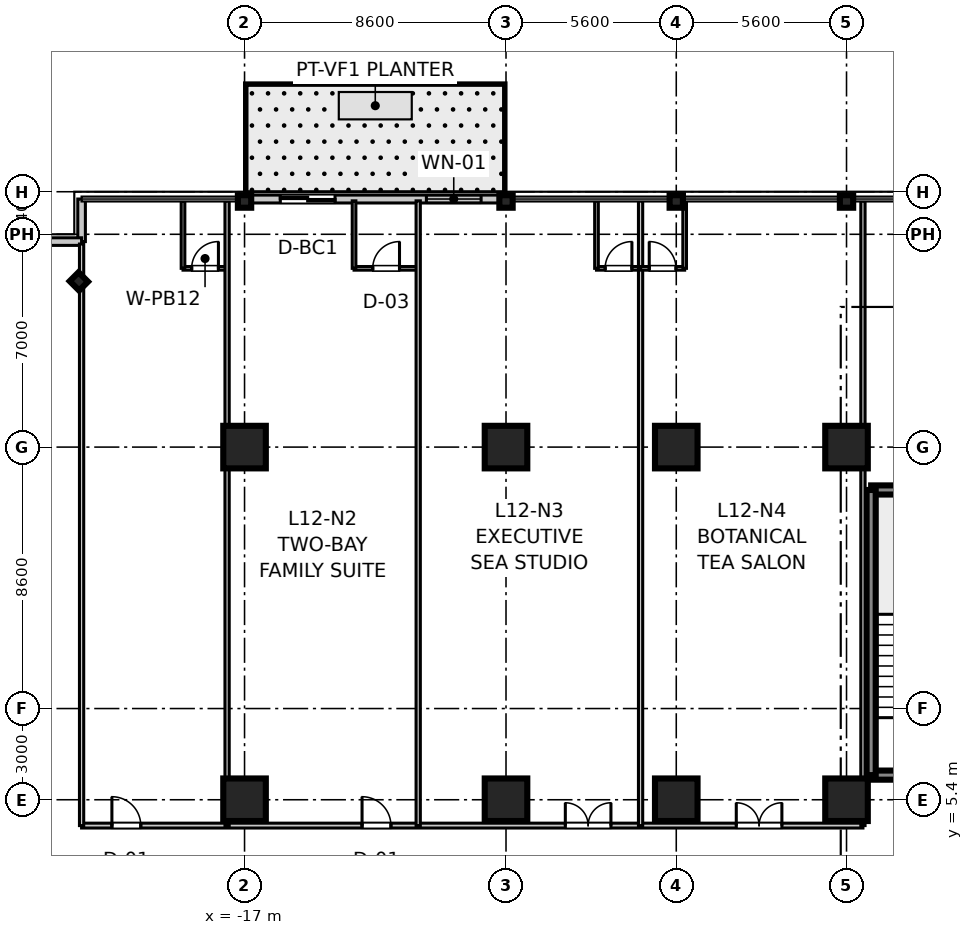
"""IFC4 building model, lengths in metres.
Left out: names, types, materials, properties, quantities, classifications, styles, units other than length and angle.
Written with IfcOpenShell. Run it as: python <this file> out.ifc"""

import sys

from ifc_helpers import new_model, si_unit, direction, frame, frame_2d, origin, origin_2d, place, context, subcontext, project, spatial, rectangle, i_section, extrude, source, transform, mapped, element, fill, save


model = new_model("IFC4")
c1 = context("Model", 3, precision=1e-05, world=origin(), true_north=direction((0.0, 1.0)))
c2 = subcontext(c1, "Body", "Model", "MODEL_VIEW")
j1 = project(units=[si_unit("LENGTHUNIT", "METRE"), si_unit("PLANEANGLEUNIT", "RADIAN")], contexts=[c1])
p1 = place(None, origin())
s1 = spatial("IfcSite", under=j1, at=p1, CompositionType="ELEMENT")
p2 = place(p1, origin())
s2 = spatial("IfcBuilding", under=s1, at=p2, CompositionType="ELEMENT")
p3 = place(p2, frame((0.0, 0.0, 54.3)))
s3 = spatial("IfcBuildingStorey", under=s2, at=p3, CompositionType="ELEMENT", Elevation=54.3)
m1 = source(origin(), c2, "Body", "SweptSolid", [
    extrude(rectangle(XDim=1.4, YDim=1.4, at=origin_2d()), origin(), (0.0, 0.0, 1.0), 3.605),
])
for number, where, z_axis, x_axis in (
    (1, (-17.0, 5.4, 0.0), (0.0, 0.0, 1.0), (1.0, 0.0, 0.0)),
    (2, (-17.0, 17.0, 0.0), (0.0, 0.0, 1.0), (1.0, 0.0, 0.0)),
    (3, (-8.4, 5.4, 0.0), (0.0, 0.0, 1.0), (1.0, 0.0, 0.0)),
    (4, (-8.4, 17.0, 0.0), (0.0, 0.0, 1.0), (1.0, 0.0, 0.0)),
    (5, (-2.8, 5.4, 0.0), (0.0, 0.0, 1.0), (1.0, 0.0, 0.0)),
    (6, (-2.8, 17.0, 0.0), (0.0, 0.0, 1.0), (1.0, 0.0, 0.0)),
    (7, (2.8, 5.4, 0.0), (0.0, 0.0, 1.0), (1.0, 0.0, 0.0)),
    (8, (2.8, 17.0, 0.0), (0.0, 0.0, 1.0), (1.0, 0.0, 0.0)),
):
    element("IfcColumn", number, at=place(p3, frame(where, z_axis=z_axis, x_axis=x_axis)), inside=s3, PredefinedType="COLUMN", context=c2, shape_type="MappedRepresentation", body=[
        mapped(m1, transform((0.0, 0.0, 0.0), scale=1.0)),
    ])
m2 = source(origin(), c2, "Body", "SweptSolid", [
    extrude(i_section(OverallWidth=0.412, OverallDepth=0.438, WebThickness=0.023, FlangeThickness=0.036, at=origin_2d()), origin(), (0.0, 0.0, 1.0), 3.605),
])
for number, where, z_axis, x_axis in (
    (9, (-17.0, 25.08, 0.0), (0.0, 0.0, 1.0), (0.0, 1.0, 0.0)),
    (10, (-8.4, 25.08, 0.0), (0.0, 0.0, 1.0), (0.0, 1.0, 0.0)),
    (11, (-2.8, 25.08, 0.0), (0.0, 0.0, 1.0), (0.0, 1.0, 0.0)),
    (12, (2.8, 25.08, 0.0), (0.0, 0.0, 1.0), (0.0, 1.0, 0.0)),
    (13, (-22.45, 22.45, 0.0), (0.0, 0.0, 1.0), (0.707, 0.707, 0.0)),
):
    element("IfcColumn", number, at=place(p3, frame(where, z_axis=z_axis, x_axis=x_axis)), inside=s3, PredefinedType="COLUMN", context=c2, shape_type="MappedRepresentation", body=[
        mapped(m2, transform((0.0, 0.0, 0.0), scale=1.0)),
    ])
m3 = source(origin(), c2, "Body", "SweptSolid", [
    extrude(rectangle(XDim=3.98, YDim=0.3, at=frame_2d((1.99, 0.0))), origin(), (0.0, 0.0, 1.0), 3.37),
])
for number, where, z_axis, x_axis in (
    (14, (3.61, 6.21, 0.0), (0.0, 0.0, 1.0), (1.0, 0.0, 0.0)),
    (15, (3.61, 15.59, 0.0), (0.0, 0.0, 1.0), (1.0, 0.0, 0.0)),
):
    element("IfcWall", number, at=place(p3, frame(where, z_axis=z_axis, x_axis=x_axis)), inside=s3, PredefinedType="SHEAR", context=c2, shape_type="MappedRepresentation", body=[
        mapped(m3, transform((0.0, 0.0, 0.0), scale=1.0)),
    ])
m4 = source(origin(), c2, "Body", "SweptSolid", [
    extrude(rectangle(XDim=9.38, YDim=0.3, at=frame_2d((4.69, 0.0))), origin(), (0.0, 0.0, 1.0), 3.37),
])
p4 = place(p3, frame((3.61, 6.21, 0.0), z_axis=(0.0, 0.0, 1.0), x_axis=(0.0, 1.0, 0.0)))
e16 = element("IfcWall", 16, at=p4, inside=s3, PredefinedType="SHEAR", context=c2, shape_type="MappedRepresentation", body=[
    mapped(m4, transform((0.0, 0.0, 0.0), scale=1.0)),
])
m5 = source(origin(), c2, "Body", "SweptSolid", [
    extrude(rectangle(XDim=1.4, YDim=0.25, at=frame_2d((0.7, 0.0))), origin(), (0.0, 0.0, 1.0), 3.37),
])
for number, where, z_axis, x_axis in (
    (17, (-22.36, 23.76, 0.0), (0.0, 0.0, 1.0), (0.0, 1.0, 0.0)),
    (18, (-23.76, 23.76, 0.0), (0.0, 0.0, 1.0), (1.0, 0.0, 0.0)),
):
    element("IfcWall", number, at=place(p3, frame(where, z_axis=z_axis, x_axis=x_axis)), inside=s3, PredefinedType="STANDARD", context=c2, shape_type="MappedRepresentation", body=[
        mapped(m5, transform((0.0, 0.0, 0.0), scale=1.0)),
    ])
m6 = source(origin(), c2, "Body", "SweptSolid", [
    extrude(rectangle(XDim=8.6, YDim=0.26, at=frame_2d((4.3, 0.0))), origin(), (0.0, 0.0, 1.0), 2.85),
])
p5 = place(p3, frame((-17.0, 25.16, 0.0), z_axis=(0.0, 0.0, 1.0), x_axis=(1.0, 0.0, 0.0)))
e19 = element("IfcWall", 19, at=p5, inside=s3, PredefinedType="STANDARD", context=c2, shape_type="MappedRepresentation", body=[
    mapped(m6, transform((0.0, 0.0, 0.0), scale=1.0)),
])
p6 = place(p5, frame((1.176, 0.0, 0.0)))
e20 = element("IfcOpeningElement", 20, at=p6, cuts=e19, PredefinedType="OPENING", context=c2, shape_type="SweptSolid", body=[
    extrude(rectangle(XDim=1.8, YDim=2.25, at=frame_2d((0.9, 1.125))), frame((0.0, 0.14, 0.0), z_axis=(0.0, -1.0, 0.0), x_axis=(1.0, 0.0, 0.0)), (0.0, 0.0, 1.0), 0.28),
])
p7 = place(p5, frame((5.981, 0.0, 0.85)))
e21 = element("IfcOpeningElement", 21, at=p7, cuts=e19, PredefinedType="OPENING", context=c2, shape_type="SweptSolid", body=[
    extrude(rectangle(XDim=1.8, YDim=1.5, at=frame_2d((0.9, 0.75))), frame((0.0, 0.14, 0.0), z_axis=(0.0, -1.0, 0.0), x_axis=(1.0, 0.0, 0.0)), (0.0, 0.0, 1.0), 0.28),
])
m7 = source(origin(), c2, "Body", "SweptSolid", [
    extrude(rectangle(XDim=25.7, YDim=0.16, at=frame_2d((12.85, 0.0))), origin(), (0.0, 0.0, 1.0), 2.71),
])
p8 = place(p3, frame((-22.36, 4.55, 0.0), z_axis=(0.0, 0.0, 1.0), x_axis=(1.0, 0.0, 0.0)))
e22 = element("IfcWall", 22, at=p8, inside=s3, PredefinedType="PARTITIONING", context=c2, shape_type="MappedRepresentation", body=[
    mapped(m7, transform((0.0, 0.0, 0.0), scale=1.0)),
])
p9 = place(p8, frame((0.997, 0.0, 0.0)))
e23 = element("IfcOpeningElement", 23, at=p9, cuts=e22, PredefinedType="OPENING", context=c2, shape_type="SweptSolid", body=[
    extrude(rectangle(XDim=0.95, YDim=2.1, at=frame_2d((0.475, 1.05))), frame((0.0, 0.09, 0.0), z_axis=(0.0, -1.0, 0.0), x_axis=(1.0, 0.0, 0.0)), (0.0, 0.0, 1.0), 0.18),
])
p10 = place(p8, frame((9.225, 0.0, 0.0)))
e24 = element("IfcOpeningElement", 24, at=p10, cuts=e22, PredefinedType="OPENING", context=c2, shape_type="SweptSolid", body=[
    extrude(rectangle(XDim=0.95, YDim=2.1, at=frame_2d((0.475, 1.05))), frame((0.0, 0.09, 0.0), z_axis=(0.0, -1.0, 0.0), x_axis=(1.0, 0.0, 0.0)), (0.0, 0.0, 1.0), 0.18),
])
p11 = place(p8, frame((15.911, 0.0, 0.0)))
e25 = element("IfcOpeningElement", 25, at=p11, cuts=e22, PredefinedType="OPENING", context=c2, shape_type="SweptSolid", body=[
    extrude(rectangle(XDim=1.5, YDim=2.15, at=frame_2d((0.75, 1.075))), frame((0.0, 0.09, 0.0), z_axis=(0.0, -1.0, 0.0), x_axis=(1.0, 0.0, 0.0)), (0.0, 0.0, 1.0), 0.18),
])
p12 = place(p8, frame((21.534, 0.0, 0.0)))
e26 = element("IfcOpeningElement", 26, at=p12, cuts=e22, PredefinedType="OPENING", context=c2, shape_type="SweptSolid", body=[
    extrude(rectangle(XDim=1.5, YDim=2.15, at=frame_2d((0.75, 1.075))), frame((0.0, 0.09, 0.0), z_axis=(0.0, -1.0, 0.0), x_axis=(1.0, 0.0, 0.0)), (0.0, 0.0, 1.0), 0.18),
])
m8 = source(origin(), c2, "Body", "SweptSolid", [
    extrude(rectangle(XDim=19.13, YDim=0.14, at=frame_2d((9.565, 0.0))), origin(), (0.0, 0.0, 1.0), 2.71),
])
p13 = place(p3, frame((-22.36, 4.55, 0.0), z_axis=(0.0, 0.0, 1.0), x_axis=(0.0, 1.0, 0.0)))
e27 = element("IfcWall", 27, at=p13, inside=s3, PredefinedType="PARTITIONING", context=c2, shape_type="MappedRepresentation", body=[
    mapped(m8, transform((0.0, 0.0, 0.0), scale=1.0)),
])
m9 = source(origin(), c2, "Body", "SweptSolid", [
    extrude(rectangle(XDim=20.55, YDim=0.14, at=frame_2d((10.275, 0.0))), origin(), (0.0, 0.0, 1.0), 2.71),
])
p14 = place(p3, frame((3.34, 4.55, 0.0), z_axis=(0.0, 0.0, 1.0), x_axis=(0.0, 1.0, 0.0)))
e28 = element("IfcWall", 28, at=p14, inside=s3, PredefinedType="PARTITIONING", context=c2, shape_type="MappedRepresentation", body=[
    mapped(m9, transform((0.0, 0.0, 0.0), scale=1.0)),
])
m10 = source(origin(), c2, "Body", "SweptSolid", [
    extrude(rectangle(XDim=1.45, YDim=0.12, at=frame_2d((0.725, 0.0))), origin(), (0.0, 0.0, 1.0), 2.71),
])
p15 = place(p3, frame((-19.024, 22.88, 0.0), z_axis=(0.0, 0.0, 1.0), x_axis=(1.0, 0.0, 0.0)))
e29 = element("IfcWall", 29, at=p15, inside=s3, PredefinedType="PARTITIONING", context=c2, shape_type="MappedRepresentation", body=[
    mapped(m10, transform((0.0, 0.0, 0.0), scale=1.0)),
])
p16 = place(p15, frame((0.285, 0.0, 0.0)))
e30 = element("IfcOpeningElement", 30, at=p16, cuts=e29, PredefinedType="OPENING", context=c2, shape_type="SweptSolid", body=[
    extrude(rectangle(XDim=0.88, YDim=2.1, at=frame_2d((0.44, 1.05))), frame((0.0, 0.07, 0.0), z_axis=(0.0, -1.0, 0.0), x_axis=(1.0, 0.0, 0.0)), (0.0, 0.0, 1.0), 0.14),
])
m11 = source(origin(), c2, "Body", "SweptSolid", [
    extrude(rectangle(XDim=2.22, YDim=0.12, at=frame_2d((1.11, 0.0))), origin(), (0.0, 0.0, 1.0), 2.71),
])
p17 = place(p3, frame((-19.024, 22.88, 0.0), z_axis=(0.0, 0.0, 1.0), x_axis=(0.0, 1.0, 0.0)))
e31 = element("IfcWall", 31, at=p17, inside=s3, PredefinedType="PARTITIONING", context=c2, shape_type="MappedRepresentation", body=[
    mapped(m11, transform((0.0, 0.0, 0.0), scale=1.0)),
])
p18 = place(p3, frame((-17.574, 4.55, 0.0), z_axis=(0.0, 0.0, 1.0), x_axis=(0.0, 1.0, 0.0)))
e32 = element("IfcWall", 32, at=p18, inside=s3, PredefinedType="PARTITIONING", context=c2, shape_type="MappedRepresentation", body=[
    mapped(m9, transform((0.0, 0.0, 0.0), scale=1.0)),
])
m12 = source(origin(), c2, "Body", "SweptSolid", [
    extrude(rectangle(XDim=2.11, YDim=0.12, at=frame_2d((1.055, 0.0))), origin(), (0.0, 0.0, 1.0), 2.71),
])
p19 = place(p3, frame((-13.398, 22.88, 0.0), z_axis=(0.0, 0.0, 1.0), x_axis=(1.0, 0.0, 0.0)))
e33 = element("IfcWall", 33, at=p19, inside=s3, PredefinedType="PARTITIONING", context=c2, shape_type="MappedRepresentation", body=[
    mapped(m12, transform((0.0, 0.0, 0.0), scale=1.0)),
])
p20 = place(p19, frame((0.615, 0.0, 0.0)))
e34 = element("IfcOpeningElement", 34, at=p20, cuts=e33, PredefinedType="OPENING", context=c2, shape_type="SweptSolid", body=[
    extrude(rectangle(XDim=0.88, YDim=2.1, at=frame_2d((0.44, 1.05))), frame((0.0, 0.07, 0.0), z_axis=(0.0, -1.0, 0.0), x_axis=(1.0, 0.0, 0.0)), (0.0, 0.0, 1.0), 0.14),
])
p21 = place(p3, frame((-13.398, 22.88, 0.0), z_axis=(0.0, 0.0, 1.0), x_axis=(0.0, 1.0, 0.0)))
e35 = element("IfcWall", 35, at=p21, inside=s3, PredefinedType="PARTITIONING", context=c2, shape_type="MappedRepresentation", body=[
    mapped(m11, transform((0.0, 0.0, 0.0), scale=1.0)),
])
p22 = place(p3, frame((-11.288, 4.55, 0.0), z_axis=(0.0, 0.0, 1.0), x_axis=(0.0, 1.0, 0.0)))
e36 = element("IfcWall", 36, at=p22, inside=s3, PredefinedType="PARTITIONING", context=c2, shape_type="MappedRepresentation", body=[
    mapped(m9, transform((0.0, 0.0, 0.0), scale=1.0)),
])
p23 = place(p3, frame((-5.424, 22.88, 0.0), z_axis=(0.0, 0.0, 1.0), x_axis=(1.0, 0.0, 0.0)))
e37 = element("IfcWall", 37, at=p23, inside=s3, PredefinedType="PARTITIONING", context=c2, shape_type="MappedRepresentation", body=[
    mapped(m10, transform((0.0, 0.0, 0.0), scale=1.0)),
])
p24 = place(p23, frame((0.285, 0.0, 0.0)))
e38 = element("IfcOpeningElement", 38, at=p24, cuts=e37, PredefinedType="OPENING", context=c2, shape_type="SweptSolid", body=[
    extrude(rectangle(XDim=0.88, YDim=2.1, at=frame_2d((0.44, 1.05))), frame((0.0, 0.07, 0.0), z_axis=(0.0, -1.0, 0.0), x_axis=(1.0, 0.0, 0.0)), (0.0, 0.0, 1.0), 0.14),
])
p25 = place(p3, frame((-5.424, 22.88, 0.0), z_axis=(0.0, 0.0, 1.0), x_axis=(0.0, 1.0, 0.0)))
e39 = element("IfcWall", 39, at=p25, inside=s3, PredefinedType="PARTITIONING", context=c2, shape_type="MappedRepresentation", body=[
    mapped(m11, transform((0.0, 0.0, 0.0), scale=1.0)),
])
p26 = place(p3, frame((-3.974, 4.55, 0.0), z_axis=(0.0, 0.0, 1.0), x_axis=(0.0, 1.0, 0.0)))
e40 = element("IfcWall", 40, at=p26, inside=s3, PredefinedType="PARTITIONING", context=c2, shape_type="MappedRepresentation", body=[
    mapped(m9, transform((0.0, 0.0, 0.0), scale=1.0)),
])
m13 = source(origin(), c2, "Body", "SweptSolid", [
    extrude(rectangle(XDim=1.45, YDim=0.12, at=frame_2d((0.725, 0.0))), origin(), (0.0, 0.0, 1.0), 2.71),
])
p27 = place(p3, frame((-3.974, 22.88, 0.0), z_axis=(0.0, 0.0, 1.0), x_axis=(1.0, 0.0, 0.0)))
e41 = element("IfcWall", 41, at=p27, inside=s3, PredefinedType="PARTITIONING", context=c2, shape_type="MappedRepresentation", body=[
    mapped(m13, transform((0.0, 0.0, 0.0), scale=1.0)),
])
p28 = place(p27, frame((0.285, 0.0, 0.0)))
e42 = element("IfcOpeningElement", 42, at=p28, cuts=e41, PredefinedType="OPENING", context=c2, shape_type="SweptSolid", body=[
    extrude(rectangle(XDim=0.88, YDim=2.1, at=frame_2d((0.44, 1.05))), frame((0.0, 0.07, 0.0), z_axis=(0.0, -1.0, 0.0), x_axis=(1.0, 0.0, 0.0)), (0.0, 0.0, 1.0), 0.14),
])
p29 = place(p3, frame((-2.524, 22.88, 0.0), z_axis=(0.0, 0.0, 1.0), x_axis=(0.0, 1.0, 0.0)))
e43 = element("IfcWall", 43, at=p29, inside=s3, PredefinedType="PARTITIONING", context=c2, shape_type="MappedRepresentation", body=[
    mapped(m11, transform((0.0, 0.0, 0.0), scale=1.0)),
])
m14 = source(origin(), c2, "Body", "SweptSolid", [
    extrude(rectangle(XDim=0.88, YDim=2.1, at=frame_2d((0.44, 1.05))), frame((0.0, 0.025, 0.0), z_axis=(0.0, -1.0, 0.0), x_axis=(1.0, 0.0, 0.0)), (0.0, 0.0, 1.0), 0.05),
])
p30 = place(p16, origin())
e44 = element("IfcDoor", 44, at=p30, inside=s3, OperationType="SINGLE_SWING_RIGHT", PredefinedType="DOOR", context=c2, shape_type="MappedRepresentation", body=[
    mapped(m14, transform((0.0, 0.0, 0.0), scale=1.0)),
])
fill(e30, e44)
m15 = source(origin(), c2, "Body", "SweptSolid", [
    extrude(rectangle(XDim=0.95, YDim=2.1, at=frame_2d((0.475, 1.05))), frame((0.0, 0.025, 0.0), z_axis=(0.0, -1.0, 0.0), x_axis=(1.0, 0.0, 0.0)), (0.0, 0.0, 1.0), 0.05),
])
p31 = place(p9, origin())
e45 = element("IfcDoor", 45, at=p31, inside=s3, OperationType="SINGLE_SWING_LEFT", PredefinedType="DOOR", context=c2, shape_type="MappedRepresentation", body=[
    mapped(m15, transform((0.0, 0.0, 0.0), scale=1.0)),
])
fill(e23, e45)
p32 = place(p20, origin())
e46 = element("IfcDoor", 46, at=p32, inside=s3, OperationType="SINGLE_SWING_RIGHT", PredefinedType="DOOR", context=c2, shape_type="MappedRepresentation", body=[
    mapped(m14, transform((0.0, 0.0, 0.0), scale=1.0)),
])
fill(e34, e46)
p33 = place(p10, origin())
e47 = element("IfcDoor", 47, at=p33, inside=s3, OperationType="SINGLE_SWING_LEFT", PredefinedType="DOOR", context=c2, shape_type="MappedRepresentation", body=[
    mapped(m15, transform((0.0, 0.0, 0.0), scale=1.0)),
])
fill(e24, e47)
p34 = place(p24, origin())
e48 = element("IfcDoor", 48, at=p34, inside=s3, OperationType="SINGLE_SWING_RIGHT", PredefinedType="DOOR", context=c2, shape_type="MappedRepresentation", body=[
    mapped(m14, transform((0.0, 0.0, 0.0), scale=1.0)),
])
fill(e38, e48)
m16 = source(origin(), c2, "Body", "SweptSolid", [
    extrude(rectangle(XDim=1.5, YDim=2.15, at=frame_2d((0.75, 1.075))), frame((0.0, 0.025, 0.0), z_axis=(0.0, -1.0, 0.0), x_axis=(1.0, 0.0, 0.0)), (0.0, 0.0, 1.0), 0.05),
])
p35 = place(p11, origin())
e49 = element("IfcDoor", 49, at=p35, inside=s3, OperationType="DOUBLE_DOOR_SINGLE_SWING", PredefinedType="DOOR", context=c2, shape_type="MappedRepresentation", body=[
    mapped(m16, transform((0.0, 0.0, 0.0), scale=1.0)),
])
fill(e25, e49)
p36 = place(p28, origin())
e50 = element("IfcDoor", 50, at=p36, inside=s3, OperationType="SINGLE_SWING_LEFT", PredefinedType="DOOR", context=c2, shape_type="MappedRepresentation", body=[
    mapped(m14, transform((0.0, 0.0, 0.0), scale=1.0)),
])
fill(e42, e50)
p37 = place(p12, origin())
e51 = element("IfcDoor", 51, at=p37, inside=s3, OperationType="DOUBLE_DOOR_SINGLE_SWING", PredefinedType="DOOR", context=c2, shape_type="MappedRepresentation", body=[
    mapped(m16, transform((0.0, 0.0, 0.0), scale=1.0)),
])
fill(e26, e51)
m17 = source(origin(), c2, "Body", "SweptSolid", [
    extrude(rectangle(XDim=1.8, YDim=2.25, at=frame_2d((0.9, 1.125))), frame((0.0, 0.025, 0.0), z_axis=(0.0, -1.0, 0.0), x_axis=(1.0, 0.0, 0.0)), (0.0, 0.0, 1.0), 0.05),
])
p38 = place(p6, origin())
e52 = element("IfcDoor", 52, at=p38, inside=s3, OperationType="DOUBLE_DOOR_SLIDING", PredefinedType="DOOR", context=c2, shape_type="MappedRepresentation", body=[
    mapped(m17, transform((0.0, 0.0, 0.0), scale=1.0)),
])
fill(e20, e52)
m18 = source(origin(), c2, "Body", "SweptSolid", [
    extrude(rectangle(XDim=1.8, YDim=1.5, at=frame_2d((0.9, 0.75))), frame((0.0, 0.03, 0.0), z_axis=(0.0, -1.0, 0.0), x_axis=(1.0, 0.0, 0.0)), (0.0, 0.0, 1.0), 0.06),
])
p39 = place(p7, origin())
e53 = element("IfcWindow", 53, at=p39, inside=s3, PartitioningType="SINGLE_PANEL", PredefinedType="WINDOW", context=c2, shape_type="MappedRepresentation", body=[
    mapped(m18, transform((0.0, 0.0, 0.0), scale=1.0)),
])
fill(e21, e53)
save(model, sys.argv[1])
